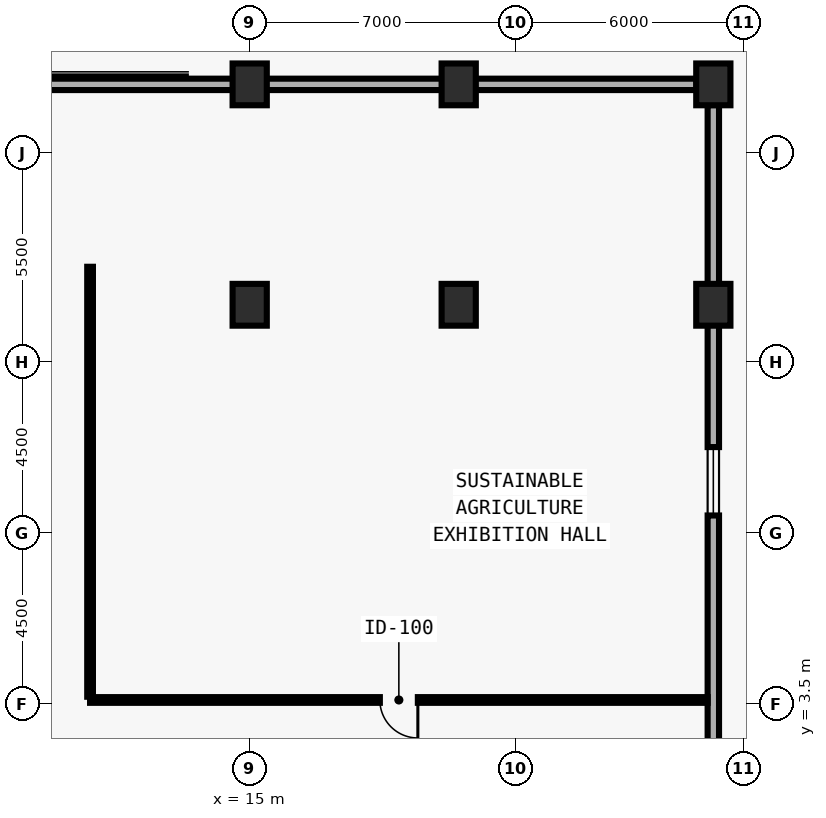
"""IFC4 building model, lengths in metres.
Left out: names, types, materials, properties, quantities, classifications, styles, units other than length and angle.
Written with IfcOpenShell. Run it as: python <this file> out.ifc"""

import sys

from ifc_helpers import new_model, si_unit, direction, frame, frame_2d, origin, origin_2d, place, context, subcontext, project, spatial, rectangle, extrude, element, fill, save


model = new_model("IFC4")
c1 = context("Model", 3, precision=1e-05, world=origin(), true_north=direction((0.0, 1.0)))
c2 = subcontext(c1, "Body", "Model", "MODEL_VIEW")
j1 = project(units=[si_unit("LENGTHUNIT", "METRE"), si_unit("PLANEANGLEUNIT", "RADIAN")], contexts=[c1])
p1 = place(None, origin())
s1 = spatial("IfcSite", under=j1, at=p1, CompositionType="ELEMENT")
p2 = place(p1, origin())
s2 = spatial("IfcBuilding", under=s1, at=p2, CompositionType="ELEMENT")
p3 = place(p2, frame((0.0, 0.0, 13.8)))
s3 = spatial("IfcBuildingStorey", under=s2, at=p3, CompositionType="ELEMENT", Elevation=13.8)
for number, where, z_axis, x_axis in (
    (1, (15.0, 14.0, 0.0), (0.0, 0.0, 1.0), (1.0, 0.0, 0.0)),
    (2, (15.0, 19.8, 0.0), (0.0, 0.0, 1.0), (1.0, 0.0, 0.0)),
    (3, (20.5, 14.0, 0.0), (0.0, 0.0, 1.0), (1.0, 0.0, 0.0)),
    (4, (20.5, 19.8, 0.0), (0.0, 0.0, 1.0), (1.0, 0.0, 0.0)),
    (5, (27.2, 14.0, 0.0), (0.0, 0.0, 1.0), (1.0, 0.0, 0.0)),
    (6, (27.2, 19.8, 0.0), (0.0, 0.0, 1.0), (1.0, 0.0, 0.0)),
):
    element("IfcColumn", number, at=place(p3, frame(where, z_axis=z_axis, x_axis=x_axis)), inside=s3, PredefinedType="COLUMN", context=c2, shape_type="SweptSolid", body=[
        extrude(rectangle(XDim=0.9, YDim=1.1, at=origin_2d()), origin(), (0.0, 0.0, 1.0), 4.575),
    ])
p4 = place(p3, frame((-26.755, 19.8, 0.0), z_axis=(0.0, 0.0, 1.0), x_axis=(1.0, 0.0, 0.0)))
e7 = element("IfcWall", 7, at=p4, inside=s3, PredefinedType="SOLIDWALL", context=c2, shape_type="SweptSolid", body=[
    extrude(rectangle(XDim=53.51, YDim=0.3, at=frame_2d((26.755, 0.0))), origin(), (0.0, 0.0, 1.0), 3.35),
])
p5 = place(p4, frame((9.0, 0.0, 0.85)))
e8 = element("IfcOpeningElement", 8, at=p5, cuts=e7, PredefinedType="OPENING", context=c2, shape_type="SweptSolid", body=[
    extrude(rectangle(XDim=2.4, YDim=1.9, at=frame_2d((1.2, 0.95))), frame((0.0, 0.16, 0.0), z_axis=(0.0, -1.0, 0.0), x_axis=(1.0, 0.0, 0.0)), (0.0, 0.0, 1.0), 0.32),
])
p6 = place(p4, frame((16.0, 0.0, 0.85)))
e9 = element("IfcOpeningElement", 9, at=p6, cuts=e7, PredefinedType="OPENING", context=c2, shape_type="SweptSolid", body=[
    extrude(rectangle(XDim=2.4, YDim=1.9, at=frame_2d((1.2, 0.95))), frame((0.0, 0.16, 0.0), z_axis=(0.0, -1.0, 0.0), x_axis=(1.0, 0.0, 0.0)), (0.0, 0.0, 1.0), 0.32),
])
p7 = place(p4, frame((29.0, 0.0, 0.85)))
e10 = element("IfcOpeningElement", 10, at=p7, cuts=e7, PredefinedType="OPENING", context=c2, shape_type="SweptSolid", body=[
    extrude(rectangle(XDim=2.4, YDim=1.9, at=frame_2d((1.2, 0.95))), frame((0.0, 0.16, 0.0), z_axis=(0.0, -1.0, 0.0), x_axis=(1.0, 0.0, 0.0)), (0.0, 0.0, 1.0), 0.32),
])
p8 = place(p3, frame((27.2, 19.255, 0.0), z_axis=(0.0, 0.0, 1.0), x_axis=(0.0, -1.0, 0.0)))
e11 = element("IfcWall", 11, at=p8, inside=s3, PredefinedType="SOLIDWALL", context=c2, shape_type="SweptSolid", body=[
    extrude(rectangle(XDim=38.51, YDim=0.3, at=frame_2d((19.255, 0.0))), origin(), (0.0, 0.0, 1.0), 3.35),
])
p9 = place(p8, frame((9.0, 0.0, 0.85)))
e12 = element("IfcOpeningElement", 12, at=p9, cuts=e11, PredefinedType="OPENING", context=c2, shape_type="SweptSolid", body=[
    extrude(rectangle(XDim=1.8, YDim=1.9, at=frame_2d((0.9, 0.95))), frame((0.0, 0.16, 0.0), z_axis=(0.0, -1.0, 0.0), x_axis=(1.0, 0.0, 0.0)), (0.0, 0.0, 1.0), 0.32),
])
p10 = place(p8, frame((29.0, 0.0, 0.85)))
e13 = element("IfcOpeningElement", 13, at=p10, cuts=e11, PredefinedType="OPENING", context=c2, shape_type="SweptSolid", body=[
    extrude(rectangle(XDim=1.8, YDim=1.9, at=frame_2d((0.9, 0.95))), frame((0.0, 0.16, 0.0), z_axis=(0.0, -1.0, 0.0), x_axis=(1.0, 0.0, 0.0)), (0.0, 0.0, 1.0), 0.32),
])
p11 = place(p3, frame((27.05, 3.6, 0.0), z_axis=(0.0, 0.0, 1.0), x_axis=(-1.0, 0.0, 0.0)))
e14 = element("IfcWall", 14, at=p11, inside=s3, PredefinedType="PARTITIONING", context=c2, shape_type="SweptSolid", body=[
    extrude(rectangle(XDim=16.25, YDim=0.15, at=frame_2d((8.125, 0.0))), origin(), (0.0, 0.0, 1.0), 4.28),
])
p12 = place(p11, frame((7.625, 0.0, 0.0)))
e15 = element("IfcOpeningElement", 15, at=p12, cuts=e14, PredefinedType="OPENING", context=c2, shape_type="SweptSolid", body=[
    extrude(rectangle(XDim=1.0, YDim=2.1, at=frame_2d((0.5, 1.05))), frame((0.0, 0.085, 0.0), z_axis=(0.0, -1.0, 0.0), x_axis=(1.0, 0.0, 0.0)), (0.0, 0.0, 1.0), 0.17),
])
p13 = place(p3, frame((10.8, 3.685, 0.0), z_axis=(0.0, 0.0, 1.0), x_axis=(0.0, 1.0, 0.0)))
e16 = element("IfcWall", 16, at=p13, inside=s3, PredefinedType="PARTITIONING", context=c2, shape_type="SweptSolid", body=[
    extrude(rectangle(XDim=11.315, YDim=0.15, at=frame_2d((5.657, 0.0))), origin(), (0.0, 0.0, 1.0), 4.28),
])
p14 = place(p9, origin())
e17 = element("IfcWindow", 17, at=p14, inside=s3, PartitioningType="SINGLE_PANEL", PredefinedType="WINDOW", context=c2, shape_type="SweptSolid", body=[
    extrude(rectangle(XDim=1.8, YDim=1.9, at=frame_2d((0.9, 0.95))), frame((0.0, 0.03, 0.0), z_axis=(0.0, -1.0, 0.0), x_axis=(1.0, 0.0, 0.0)), (0.0, 0.0, 1.0), 0.06),
])
fill(e12, e17)
p15 = place(p12, origin())
e18 = element("IfcDoor", 18, at=p15, inside=s3, OperationType="SINGLE_SWING_LEFT", PredefinedType="DOOR", context=c2, shape_type="SweptSolid", body=[
    extrude(rectangle(XDim=1.0, YDim=2.1, at=frame_2d((0.5, 1.05))), frame((0.0, 0.025, 0.0), z_axis=(0.0, -1.0, 0.0), x_axis=(1.0, 0.0, 0.0)), (0.0, 0.0, 1.0), 0.05),
])
fill(e15, e18)
save(model, sys.argv[1])
